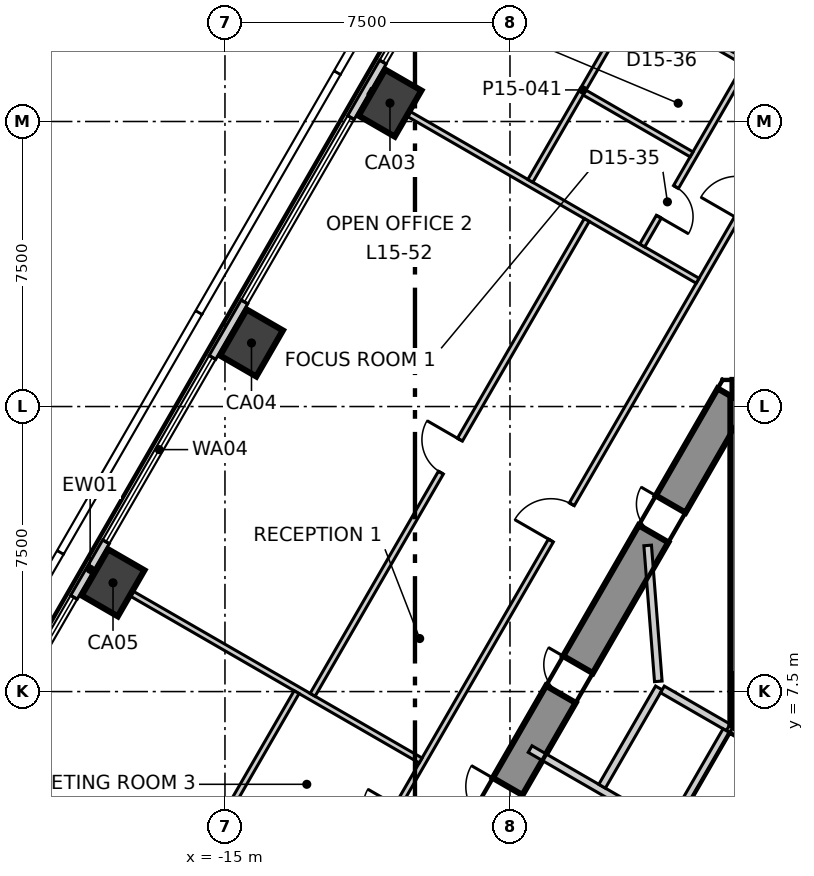
"""IFC4 building model, lengths in metres.
Left out: names, types, materials, properties, quantities, classifications, styles, units other than length and angle.
Written with IfcOpenShell. Run it as: python <this file> out.ifc"""

import sys

from ifc_helpers import new_model, si_unit, direction, frame, frame_2d, origin, origin_2d, place, context, subcontext, project, spatial, polyline, rectangle, outline, extrude, element, fill, save


model = new_model("IFC4")
c1 = context("Model", 3, precision=1e-05, world=origin(), true_north=direction((0.0, 1.0)))
c2 = subcontext(c1, "Body", "Model", "MODEL_VIEW")
j1 = project(units=[si_unit("LENGTHUNIT", "METRE"), si_unit("PLANEANGLEUNIT", "RADIAN")], contexts=[c1])
p1 = place(None, origin())
s1 = spatial("IfcSite", under=j1, at=p1, CompositionType="ELEMENT")
p2 = place(p1, origin())
s2 = spatial("IfcBuilding", under=s1, at=p2, CompositionType="ELEMENT")
p3 = place(p2, frame((0.0, 0.0, 71.3)))
s3 = spatial("IfcBuildingStorey", under=s2, at=p3, CompositionType="ELEMENT", Elevation=71.3)
p4 = place(p3, frame((1.645, 15.25, -0.3), z_axis=(0.0, 0.0, 1.0), x_axis=(-1.0, 0.0, 0.0)))
e1 = element("IfcWall", 1, at=p4, inside=s3, PredefinedType="SHEAR", context=c2, shape_type="SweptSolid", body=[
    extrude(outline(polyline([(-0.26, -0.45), (1.645, -0.45), (3.55, -0.45), (3.031, 0.45), (1.645, 0.45), (0.259, 0.45), (-0.26, -0.45)])), origin(), (0.0, 0.0, 1.0), 4.0),
])
p5 = place(p4, frame((0.945, 0.0, 0.3)))
e2 = element("IfcOpeningElement", 2, at=p5, cuts=e1, PredefinedType="OPENING", context=c2, shape_type="SweptSolid", body=[
    extrude(rectangle(XDim=1.4, YDim=2.1, at=frame_2d((0.7, 1.05))), frame((0.0, 0.46, 0.0), z_axis=(0.0, -1.0, 0.0), x_axis=(1.0, 0.0, 0.0)), (0.0, 0.0, 1.0), 0.92),
])
p6 = place(p3, frame((-1.645, 15.25, -0.3), z_axis=(0.0, 0.0, 1.0), x_axis=(-0.500026485275, -0.866010111964, 0.0)))
e3 = element("IfcWall", 3, at=p6, inside=s3, PredefinedType="SHEAR", context=c2, shape_type="SweptSolid", body=[
    extrude(outline(polyline([(-0.26, -0.45), (1.685, -0.45), (3.63, -0.45), (5.576, -0.45), (7.521, -0.45), (9.466, -0.449), (11.411, -0.449), (13.357, -0.449), (15.302, -0.449), (17.247, -0.449), (19.192, -0.449), (21.138, -0.449), (23.083, -0.449), (25.028, -0.449), (24.509, 0.45), (22.644, 0.45), (20.778, 0.45), (18.913, 0.45), (17.048, 0.45), (15.182, 0.449), (13.317, 0.449), (11.452, 0.449), (9.587, 0.449), (7.721, 0.449), (5.856, 0.449), (3.991, 0.449), (2.125, 0.449), (0.26, 0.449), (-0.26, -0.45)])), origin(), (0.0, 0.0, 1.0), 4.0),
])
p7 = place(p6, frame((11.834, 0.0, 0.3)))
e4 = element("IfcOpeningElement", 4, at=p7, cuts=e3, PredefinedType="OPENING", context=c2, shape_type="SweptSolid", body=[
    extrude(rectangle(XDim=1.1, YDim=2.1, at=frame_2d((0.55, 1.05))), frame((0.0, 0.46, 0.0), z_axis=(0.0, -1.0, 0.0), x_axis=(1.0, 0.0, 0.0)), (0.0, 0.0, 1.0), 0.92),
])
p8 = place(p6, frame((8.13, 0.0, 0.3)))
e5 = element("IfcOpeningElement", 5, at=p8, cuts=e3, PredefinedType="OPENING", context=c2, shape_type="SweptSolid", body=[
    extrude(rectangle(XDim=0.9, YDim=2.1, at=frame_2d((0.45, 1.05))), frame((0.0, 0.46, 0.0), z_axis=(0.0, -1.0, 0.0), x_axis=(1.0, 0.0, 0.0)), (0.0, 0.0, 1.0), 0.92),
])
p9 = place(p6, frame((3.255, 0.0, 0.3)))
e6 = element("IfcOpeningElement", 6, at=p9, cuts=e3, PredefinedType="OPENING", context=c2, shape_type="SweptSolid", body=[
    extrude(rectangle(XDim=0.9, YDim=2.1, at=frame_2d((0.45, 1.05))), frame((0.0, 0.46, 0.0), z_axis=(0.0, -1.0, 0.0), x_axis=(1.0, 0.0, 0.0)), (0.0, 0.0, 1.0), 0.92),
])
for number, where, z_axis, x_axis in (
    (7, (-10.658, 22.984, -0.3), (0.0, 0.0, 1.0), (0.5, 0.866, 0.0)),
    (8, (-14.302, 16.672, -0.3), (0.0, 0.0, 1.0), (0.5, 0.866, 0.0)),
    (9, (-17.946, 10.361, -0.3), (0.0, 0.0, 1.0), (0.5, 0.866, 0.0)),
):
    element("IfcColumn", number, at=place(p3, frame(where, z_axis=z_axis, x_axis=x_axis)), inside=s3, PredefinedType="COLUMN", context=c2, shape_type="SweptSolid", body=[
        extrude(rectangle(XDim=1.4, YDim=1.1, at=origin_2d()), origin(), (0.0, 0.0, 1.0), 4.0),
    ])
p10 = place(p3, frame((-3.326, 37.084, 0.0), z_axis=(0.0, 0.0, 1.0), x_axis=(-0.500000131003, -0.86602532815, 0.0)))
e10 = element("IfcWall", 10, at=p10, inside=s3, PredefinedType="ELEMENTEDWALL", context=c2, shape_type="SweptSolid", body=[
    extrude(rectangle(XDim=60.886, YDim=0.2, at=frame_2d((30.443, 0.0))), origin(), (0.0, 0.0, 1.0), 3.7),
])
p11 = place(p10, frame((2.146, 0.0, 0.9)))
e11 = element("IfcOpeningElement", 11, at=p11, cuts=e10, PredefinedType="OPENING", context=c2, shape_type="SweptSolid", body=[
    extrude(rectangle(XDim=5.6, YDim=2.5, at=frame_2d((2.8, 1.25))), frame((0.0, 0.11, 0.0), z_axis=(0.0, -1.0, 0.0), x_axis=(1.0, 0.0, 0.0)), (0.0, 0.0, 1.0), 0.22),
])
p12 = place(p10, frame((9.434, 0.0, 0.9)))
e12 = element("IfcOpeningElement", 12, at=p12, cuts=e10, PredefinedType="OPENING", context=c2, shape_type="SweptSolid", body=[
    extrude(rectangle(XDim=5.6, YDim=2.5, at=frame_2d((2.8, 1.25))), frame((0.0, 0.11, 0.0), z_axis=(0.0, -1.0, 0.0), x_axis=(1.0, 0.0, 0.0)), (0.0, 0.0, 1.0), 0.22),
])
p13 = place(p10, frame((16.721, 0.0, 0.9)))
e13 = element("IfcOpeningElement", 13, at=p13, cuts=e10, PredefinedType="OPENING", context=c2, shape_type="SweptSolid", body=[
    extrude(rectangle(XDim=5.6, YDim=2.5, at=frame_2d((2.8, 1.25))), frame((0.0, 0.11, 0.0), z_axis=(0.0, -1.0, 0.0), x_axis=(1.0, 0.0, 0.0)), (0.0, 0.0, 1.0), 0.22),
])
p14 = place(p10, frame((24.009, 0.0, 0.9)))
e14 = element("IfcOpeningElement", 14, at=p14, cuts=e10, PredefinedType="OPENING", context=c2, shape_type="SweptSolid", body=[
    extrude(rectangle(XDim=5.6, YDim=2.5, at=frame_2d((2.8, 1.25))), frame((0.0, 0.11, 0.0), z_axis=(0.0, -1.0, 0.0), x_axis=(1.0, 0.0, 0.0)), (0.0, 0.0, 1.0), 0.22),
])
p15 = place(p10, frame((31.297, 0.0, 0.9)))
e15 = element("IfcOpeningElement", 15, at=p15, cuts=e10, PredefinedType="OPENING", context=c2, shape_type="SweptSolid", body=[
    extrude(rectangle(XDim=5.6, YDim=2.5, at=frame_2d((2.8, 1.25))), frame((0.0, 0.11, 0.0), z_axis=(0.0, -1.0, 0.0), x_axis=(1.0, 0.0, 0.0)), (0.0, 0.0, 1.0), 0.22),
])
p16 = place(p10, frame((38.584, 0.0, 0.9)))
e16 = element("IfcOpeningElement", 16, at=p16, cuts=e10, PredefinedType="OPENING", context=c2, shape_type="SweptSolid", body=[
    extrude(rectangle(XDim=5.6, YDim=2.5, at=frame_2d((2.8, 1.25))), frame((0.0, 0.11, 0.0), z_axis=(0.0, -1.0, 0.0), x_axis=(1.0, 0.0, 0.0)), (0.0, 0.0, 1.0), 0.22),
])
p17 = place(p10, frame((45.872, 0.0, 0.9)))
e17 = element("IfcOpeningElement", 17, at=p17, cuts=e10, PredefinedType="OPENING", context=c2, shape_type="SweptSolid", body=[
    extrude(rectangle(XDim=5.6, YDim=2.5, at=frame_2d((2.8, 1.25))), frame((0.0, 0.11, 0.0), z_axis=(0.0, -1.0, 0.0), x_axis=(1.0, 0.0, 0.0)), (0.0, 0.0, 1.0), 0.22),
])
p18 = place(p10, frame((53.159, 0.0, 0.9)))
e18 = element("IfcOpeningElement", 18, at=p18, cuts=e10, PredefinedType="OPENING", context=c2, shape_type="SweptSolid", body=[
    extrude(rectangle(XDim=5.6, YDim=2.5, at=frame_2d((2.8, 1.25))), frame((0.0, 0.11, 0.0), z_axis=(0.0, -1.0, 0.0), x_axis=(1.0, 0.0, 0.0)), (0.0, 0.0, 1.0), 0.22),
])
p19 = place(p3, frame((-19.497, -11.17, 0.0), z_axis=(0.0, 0.0, 1.0), x_axis=(0.499998854553, 0.866026065108, 0.0)))
e19 = element("IfcWall", 19, at=p19, inside=s3, PredefinedType="PARTITIONING", context=c2, shape_type="SweptSolid", body=[
    extrude(rectangle(XDim=38.994, YDim=0.15, at=frame_2d((19.497, 0.0))), origin(), (0.0, 0.0, 1.0), 3.7),
])
p20 = place(p19, frame((35.944, 0.0, 0.0)))
e20 = element("IfcOpeningElement", 20, at=p20, cuts=e19, PredefinedType="OPENING", context=c2, shape_type="SweptSolid", body=[
    extrude(rectangle(XDim=1.1, YDim=2.1, at=frame_2d((0.55, 1.05))), frame((0.0, 0.085, 0.0), z_axis=(0.0, -1.0, 0.0), x_axis=(1.0, 0.0, 0.0)), (0.0, 0.0, 1.0), 0.17),
])
p21 = place(p19, frame((26.148, 0.0, 0.0)))
e21 = element("IfcOpeningElement", 21, at=p21, cuts=e19, PredefinedType="OPENING", context=c2, shape_type="SweptSolid", body=[
    extrude(rectangle(XDim=1.1, YDim=2.1, at=frame_2d((0.55, 1.05))), frame((0.0, 0.085, 0.0), z_axis=(0.0, -1.0, 0.0), x_axis=(1.0, 0.0, 0.0)), (0.0, 0.0, 1.0), 0.17),
])
p22 = place(p19, frame((8.572, 0.0, 0.0)))
e22 = element("IfcOpeningElement", 22, at=p22, cuts=e19, PredefinedType="OPENING", context=c2, shape_type="SweptSolid", body=[
    extrude(rectangle(XDim=1.1, YDim=2.1, at=frame_2d((0.55, 1.05))), frame((0.0, 0.085, 0.0), z_axis=(0.0, -1.0, 0.0), x_axis=(1.0, 0.0, 0.0)), (0.0, 0.0, 1.0), 0.17),
])
p23 = place(p19, frame((17.172, 0.0, 0.0)))
e23 = element("IfcOpeningElement", 23, at=p23, cuts=e19, PredefinedType="OPENING", context=c2, shape_type="SweptSolid", body=[
    extrude(rectangle(XDim=0.9, YDim=2.1, at=frame_2d((0.45, 1.05))), frame((0.0, 0.085, 0.0), z_axis=(0.0, -1.0, 0.0), x_axis=(1.0, 0.0, 0.0)), (0.0, 0.0, 1.0), 0.17),
])
p24 = place(p19, frame((14.172, 0.0, 0.0)))
e24 = element("IfcOpeningElement", 24, at=p24, cuts=e19, PredefinedType="OPENING", context=c2, shape_type="SweptSolid", body=[
    extrude(rectangle(XDim=0.9, YDim=2.1, at=frame_2d((0.45, 1.05))), frame((0.0, 0.085, 0.0), z_axis=(0.0, -1.0, 0.0), x_axis=(1.0, 0.0, 0.0)), (0.0, 0.0, 1.0), 0.17),
])
p25 = place(p19, frame((1.797, 0.0, 0.0)))
e25 = element("IfcOpeningElement", 25, at=p25, cuts=e19, PredefinedType="OPENING", context=c2, shape_type="SweptSolid", body=[
    extrude(rectangle(XDim=1.1, YDim=2.1, at=frame_2d((0.55, 1.05))), frame((0.0, 0.085, 0.0), z_axis=(0.0, -1.0, 0.0), x_axis=(1.0, 0.0, 0.0)), (0.0, 0.0, 1.0), 0.17),
])
p26 = place(p3, frame((-18.483, 10.671, 0.0), z_axis=(0.0, 0.0, 1.0), x_axis=(0.866012634826, -0.500022115832, 0.0)))
e26 = element("IfcWall", 26, at=p26, inside=s3, PredefinedType="PARTITIONING", context=c2, shape_type="SweptSolid", body=[
    extrude(rectangle(XDim=9.967, YDim=0.15, at=frame_2d((4.984, 0.0))), origin(), (0.0, 0.0, 1.0), 3.2),
])
p27 = place(p3, frame((-14.877, 4.432, 0.0), z_axis=(0.0, 0.0, 1.0), x_axis=(0.499826373536, 0.866125623866, 0.0)))
e27 = element("IfcWall", 27, at=p27, inside=s3, PredefinedType="PARTITIONING", context=c2, shape_type="SweptSolid", body=[
    extrude(rectangle(XDim=3.525, YDim=0.15, at=frame_2d((1.763, 0.0))), origin(), (0.0, 0.0, 1.0), 3.7),
])
p28 = place(p3, frame((-11.195, 23.294, 0.0), z_axis=(0.0, 0.0, 1.0), x_axis=(0.866018758693, -0.500011509459, 0.0)))
e28 = element("IfcWall", 28, at=p28, inside=s3, PredefinedType="PARTITIONING", context=c2, shape_type="SweptSolid", body=[
    extrude(rectangle(XDim=9.968, YDim=0.15, at=frame_2d((4.984, 0.0))), origin(), (0.0, 0.0, 1.0), 3.7),
])
p29 = place(p3, frame((-12.693, 7.415, 0.0), z_axis=(0.0, 0.0, 1.0), x_axis=(0.500017889033, 0.8660150753, 0.0)))
e29 = element("IfcWall", 29, at=p29, inside=s3, PredefinedType="PARTITIONING", context=c2, shape_type="SweptSolid", body=[
    extrude(rectangle(XDim=14.426, YDim=0.15, at=frame_2d((7.213, 0.0))), origin(), (0.0, 0.0, 1.0), 3.7),
])
p30 = place(p29, frame((6.751, 0.0, 0.0)))
e30 = element("IfcOpeningElement", 30, at=p30, cuts=e29, PredefinedType="OPENING", context=c2, shape_type="SweptSolid", body=[
    extrude(rectangle(XDim=1.0, YDim=2.1, at=frame_2d((0.5, 1.05))), frame((0.0, 0.085, 0.0), z_axis=(0.0, -1.0, 0.0), x_axis=(1.0, 0.0, 0.0)), (0.0, 0.0, 1.0), 0.17),
])
p31 = place(p3, frame((-6.964, 20.938, 0.0), z_axis=(0.0, 0.0, 1.0), x_axis=(0.499950687084, 0.866053872738, 0.0)))
e31 = element("IfcWall", 31, at=p31, inside=s3, PredefinedType="PARTITIONING", context=c2, shape_type="SweptSolid", body=[
    extrude(rectangle(XDim=5.525, YDim=0.15, at=frame_2d((2.762, 0.0))), origin(), (0.0, 0.0, 1.0), 3.7),
])
p32 = place(p3, frame((-4.02, 19.238, 0.0), z_axis=(0.0, 0.0, 1.0), x_axis=(0.500050108258, 0.865996471835, 0.0)))
e32 = element("IfcWall", 32, at=p32, inside=s3, PredefinedType="PARTITIONING", context=c2, shape_type="SweptSolid", body=[
    extrude(rectangle(XDim=5.525, YDim=0.15, at=frame_2d((2.763, 0.0))), origin(), (0.0, 0.0, 1.0), 3.7),
])
p33 = place(p32, frame((0.875, 0.0, 0.0)))
e33 = element("IfcOpeningElement", 33, at=p33, cuts=e32, PredefinedType="OPENING", context=c2, shape_type="SweptSolid", body=[
    extrude(rectangle(XDim=0.9, YDim=2.1, at=frame_2d((0.45, 1.05))), frame((0.0, 0.085, 0.0), z_axis=(0.0, -1.0, 0.0), x_axis=(1.0, 0.0, 0.0)), (0.0, 0.0, 1.0), 0.17),
])
p34 = place(p3, frame((-4.137, 25.685, 0.0), z_axis=(0.0, 0.0, 1.0), x_axis=(0.866053003207, -0.499952193351, 0.0)))
e34 = element("IfcWall", 34, at=p34, inside=s3, PredefinedType="PARTITIONING", context=c2, shape_type="SweptSolid", body=[
    extrude(rectangle(XDim=3.25, YDim=0.15, at=frame_2d((1.625, 0.0))), origin(), (0.0, 0.0, 1.0), 3.7),
])
p35 = place(p34, frame((1.175, 0.0, 0.0)))
e35 = element("IfcOpeningElement", 35, at=p35, cuts=e34, PredefinedType="OPENING", context=c2, shape_type="SweptSolid", body=[
    extrude(rectangle(XDim=0.9, YDim=2.1, at=frame_2d((0.45, 1.05))), frame((0.0, 0.085, 0.0), z_axis=(0.0, -1.0, 0.0), x_axis=(1.0, 0.0, 0.0)), (0.0, 0.0, 1.0), 0.17),
])
p36 = place(p3, frame((-5.537, 23.26, 0.0), z_axis=(0.0, 0.0, 1.0), x_axis=(0.866071776036, -0.499919672301, 0.0)))
e36 = element("IfcWall", 36, at=p36, inside=s3, PredefinedType="PARTITIONING", context=c2, shape_type="SweptSolid", body=[
    extrude(rectangle(XDim=3.25, YDim=0.15, at=frame_2d((1.625, 0.0))), origin(), (0.0, 0.0, 1.0), 3.7),
])
p37 = place(p3, frame((-6.97, 5.987, 0.0), z_axis=(0.0, 0.0, 1.0), x_axis=(0.866029956157, -0.499992114976, 0.0)))
e37 = element("IfcWall", 37, at=p37, inside=s3, PredefinedType="SOLIDWALL", context=c2, shape_type="SweptSolid", body=[
    extrude(rectangle(XDim=4.232, YDim=0.2, at=frame_2d((2.116, 0.0))), origin(), (0.0, 0.0, 1.0), 3.7),
])
p38 = place(p37, frame((2.73, 0.0, 0.0)))
e38 = element("IfcOpeningElement", 38, at=p38, cuts=e37, PredefinedType="OPENING", context=c2, shape_type="SweptSolid", body=[
    extrude(rectangle(XDim=0.9, YDim=2.1, at=frame_2d((0.45, 1.05))), frame((0.0, 0.11, 0.0), z_axis=(0.0, -1.0, 0.0), x_axis=(1.0, 0.0, 0.0)), (0.0, 0.0, 1.0), 0.22),
])
p39 = place(p3, frame((-5.076, 5.009, 0.0), z_axis=(0.0, 0.0, 1.0), x_axis=(0.500085598968, 0.865975977556, 0.0)))
e39 = element("IfcWall", 39, at=p39, inside=s3, PredefinedType="SOLIDWALL", context=c2, shape_type="SweptSolid", body=[
    extrude(rectangle(XDim=2.987, YDim=0.2, at=frame_2d((1.494, 0.0))), origin(), (0.0, 0.0, 1.0), 3.7),
])
p40 = place(p3, frame((-3.489, 7.557, 0.0), z_axis=(0.0, 0.0, 1.0), x_axis=(0.866010750942, -0.50002537861, 0.0)))
e40 = element("IfcWall", 40, at=p40, inside=s3, PredefinedType="SOLIDWALL", context=c2, shape_type="SweptSolid", body=[
    extrude(rectangle(XDim=2.0, YDim=0.2, at=frame_2d((1.0, 0.0))), origin(), (0.0, 0.0, 1.0), 3.7),
])
p41 = place(p3, frame((-3.257, 3.959, 0.0), z_axis=(0.0, 0.0, 1.0), x_axis=(0.50012328804, 0.865954211699, 0.0)))
e41 = element("IfcWall", 41, at=p41, inside=s3, PredefinedType="SOLIDWALL", context=c2, shape_type="SweptSolid", body=[
    extrude(rectangle(XDim=2.9, YDim=0.2, at=frame_2d((1.45, 0.0))), origin(), (0.0, 0.0, 1.0), 3.7),
])
p42 = place(p3, frame((-1.67, 6.507, 0.0), z_axis=(0.0, 0.0, 1.0), x_axis=(0.865941441609, -0.500145398563, 0.0)))
e42 = element("IfcWall", 42, at=p42, inside=s3, PredefinedType="SOLIDWALL", context=c2, shape_type="SweptSolid", body=[
    extrude(rectangle(XDim=1.815, YDim=0.2, at=frame_2d((0.908, 0.0))), origin(), (0.0, 0.0, 1.0), 3.7),
])
p43 = place(p3, frame((-3.877, 11.345, 0.0), z_axis=(0.0, 0.0, 1.0), x_axis=(0.078070537984, -0.996947837702, 0.0)))
e43 = element("IfcWall", 43, at=p43, inside=s3, PredefinedType="SOLIDWALL", context=c2, shape_type="SweptSolid", body=[
    extrude(rectangle(XDim=3.587, YDim=0.2, at=frame_2d((1.793, 0.0))), origin(), (0.0, 0.0, 1.0), 3.7),
])
p44 = place(p3, frame((-1.6, 6.615, 0.0), z_axis=(0.0, 0.0, 1.0), x_axis=(0.0, 1.0, 0.0)))
e44 = element("IfcWall", 44, at=p44, inside=s3, PredefinedType="SOLIDWALL", context=c2, shape_type="SweptSolid", body=[
    extrude(rectangle(XDim=8.615, YDim=0.2, at=frame_2d((4.308, 0.0))), origin(), (0.0, 0.0, 1.0), 3.7),
])
p45 = place(p12, origin())
e45 = element("IfcWindow", 45, at=p45, inside=s3, PartitioningType="SINGLE_PANEL", PredefinedType="WINDOW", context=c2, shape_type="SweptSolid", body=[
    extrude(rectangle(XDim=5.6, YDim=2.5, at=frame_2d((2.8, 1.25))), frame((0.0, 0.03, 0.0), z_axis=(0.0, -1.0, 0.0), x_axis=(1.0, 0.0, 0.0)), (0.0, 0.0, 1.0), 0.06),
])
fill(e12, e45)
p46 = place(p13, origin())
e46 = element("IfcWindow", 46, at=p46, inside=s3, PartitioningType="SINGLE_PANEL", PredefinedType="WINDOW", context=c2, shape_type="SweptSolid", body=[
    extrude(rectangle(XDim=5.6, YDim=2.5, at=frame_2d((2.8, 1.25))), frame((0.0, 0.03, 0.0), z_axis=(0.0, -1.0, 0.0), x_axis=(1.0, 0.0, 0.0)), (0.0, 0.0, 1.0), 0.06),
])
fill(e13, e46)
p47 = place(p14, origin())
e47 = element("IfcWindow", 47, at=p47, inside=s3, PartitioningType="SINGLE_PANEL", PredefinedType="WINDOW", context=c2, shape_type="SweptSolid", body=[
    extrude(rectangle(XDim=5.6, YDim=2.5, at=frame_2d((2.8, 1.25))), frame((0.0, 0.03, 0.0), z_axis=(0.0, -1.0, 0.0), x_axis=(1.0, 0.0, 0.0)), (0.0, 0.0, 1.0), 0.06),
])
fill(e14, e47)
p48 = place(p15, origin())
e48 = element("IfcWindow", 48, at=p48, inside=s3, PartitioningType="SINGLE_PANEL", PredefinedType="WINDOW", context=c2, shape_type="SweptSolid", body=[
    extrude(rectangle(XDim=5.6, YDim=2.5, at=frame_2d((2.8, 1.25))), frame((0.0, 0.03, 0.0), z_axis=(0.0, -1.0, 0.0), x_axis=(1.0, 0.0, 0.0)), (0.0, 0.0, 1.0), 0.06),
])
fill(e15, e48)
p49 = place(p33, origin())
e49 = element("IfcDoor", 49, at=p49, inside=s3, OperationType="SINGLE_SWING_LEFT", PredefinedType="DOOR", context=c2, shape_type="SweptSolid", body=[
    extrude(rectangle(XDim=0.9, YDim=2.1, at=frame_2d((0.45, 1.05))), frame((0.0, 0.025, 0.0), z_axis=(0.0, -1.0, 0.0), x_axis=(1.0, 0.0, 0.0)), (0.0, 0.0, 1.0), 0.05),
])
fill(e33, e49)
p50 = place(p21, origin())
e50 = element("IfcDoor", 50, at=p50, inside=s3, OperationType="SINGLE_SWING_RIGHT", PredefinedType="DOOR", context=c2, shape_type="SweptSolid", body=[
    extrude(rectangle(XDim=1.1, YDim=2.1, at=frame_2d((0.55, 1.05))), frame((0.0, 0.025, 0.0), z_axis=(0.0, -1.0, 0.0), x_axis=(1.0, 0.0, 0.0)), (0.0, 0.0, 1.0), 0.05),
])
fill(e21, e50)
p51 = place(p30, origin())
e51 = element("IfcDoor", 51, at=p51, inside=s3, OperationType="SINGLE_SWING_LEFT", PredefinedType="DOOR", context=c2, shape_type="SweptSolid", body=[
    extrude(rectangle(XDim=1.0, YDim=2.1, at=frame_2d((0.5, 1.05))), frame((0.0, 0.025, 0.0), z_axis=(0.0, -1.0, 0.0), x_axis=(1.0, 0.0, 0.0)), (0.0, 0.0, 1.0), 0.05),
])
fill(e30, e51)
p52 = place(p7, origin())
e52 = element("IfcDoor", 52, at=p52, inside=s3, OperationType="SINGLE_SWING_LEFT", PredefinedType="DOOR", context=c2, shape_type="SweptSolid", body=[
    extrude(rectangle(XDim=1.1, YDim=2.1, at=frame_2d((0.55, 1.05))), frame((0.0, 0.025, 0.0), z_axis=(0.0, -1.0, 0.0), x_axis=(1.0, 0.0, 0.0)), (0.0, 0.0, 1.0), 0.05),
])
fill(e4, e52)
p53 = place(p8, origin())
e53 = element("IfcDoor", 53, at=p53, inside=s3, OperationType="SINGLE_SWING_LEFT", PredefinedType="DOOR", context=c2, shape_type="SweptSolid", body=[
    extrude(rectangle(XDim=0.9, YDim=2.1, at=frame_2d((0.45, 1.05))), frame((0.0, 0.025, 0.0), z_axis=(0.0, -1.0, 0.0), x_axis=(1.0, 0.0, 0.0)), (0.0, 0.0, 1.0), 0.05),
])
fill(e5, e53)
p54 = place(p9, origin())
e54 = element("IfcDoor", 54, at=p54, inside=s3, OperationType="SINGLE_SWING_LEFT", PredefinedType="DOOR", context=c2, shape_type="SweptSolid", body=[
    extrude(rectangle(XDim=0.9, YDim=2.1, at=frame_2d((0.45, 1.05))), frame((0.0, 0.025, 0.0), z_axis=(0.0, -1.0, 0.0), x_axis=(1.0, 0.0, 0.0)), (0.0, 0.0, 1.0), 0.05),
])
fill(e6, e54)
save(model, sys.argv[1])
